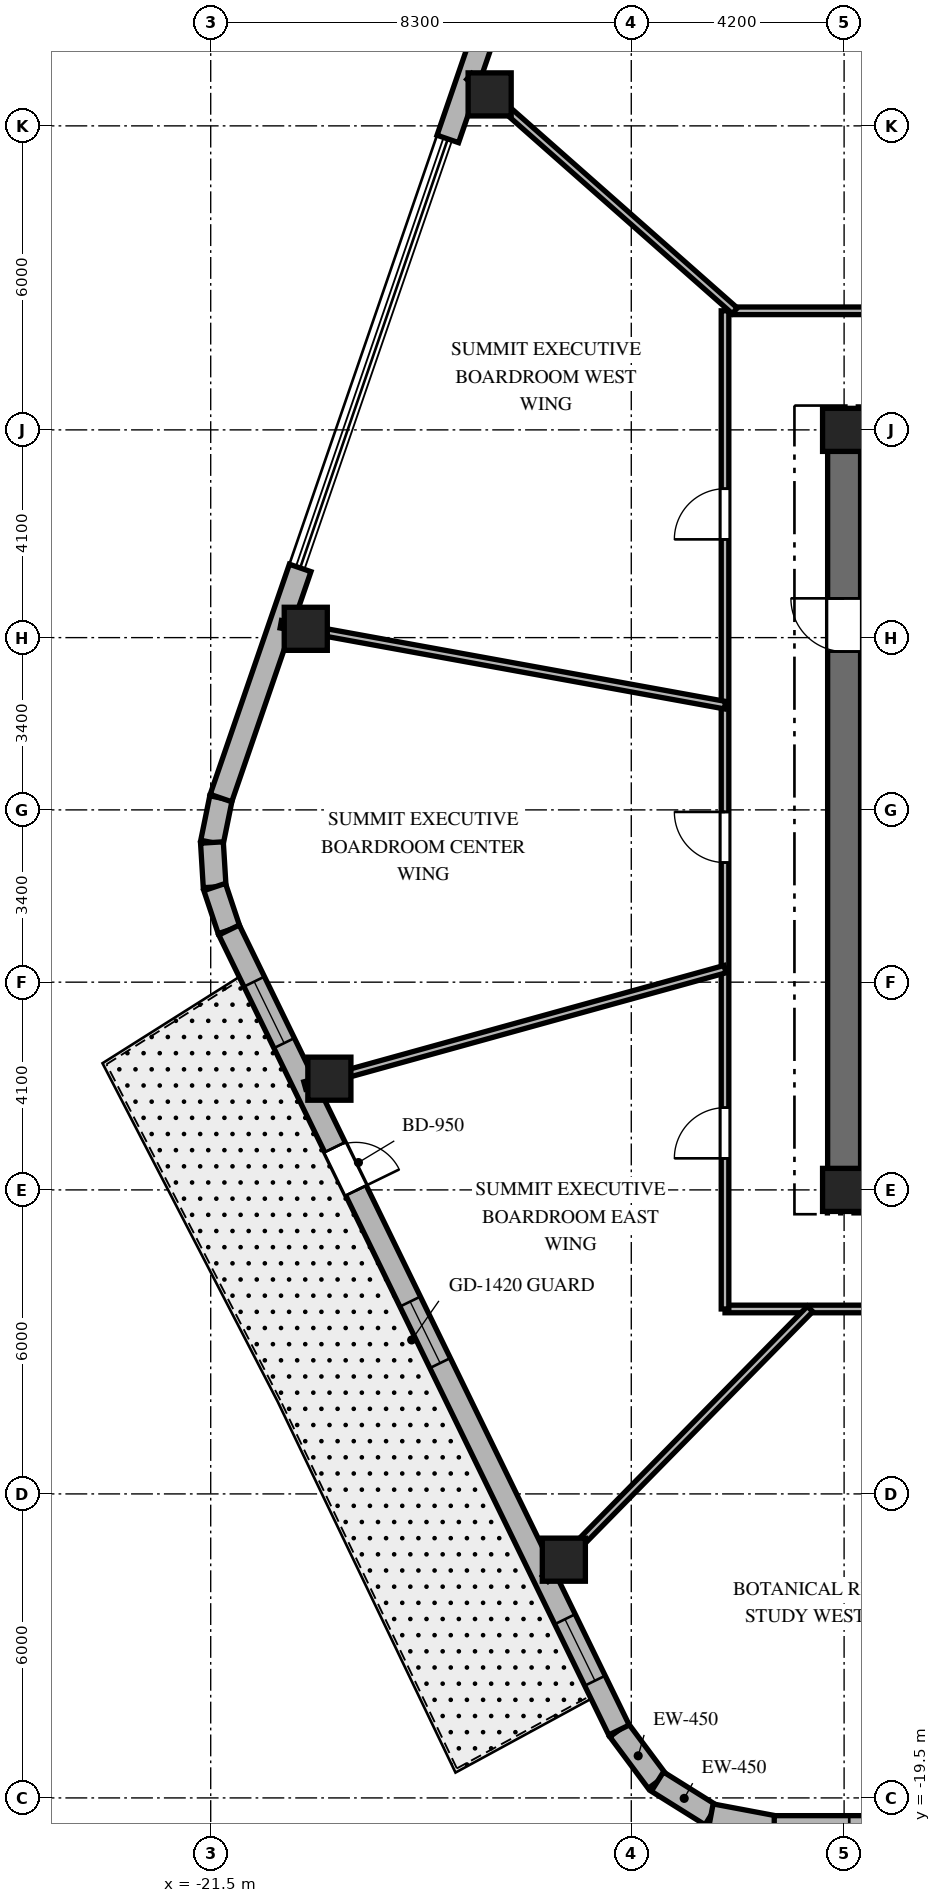
"""IFC4 building model, lengths in metres.
Left out: names, types, materials, properties, quantities, classifications, styles, units other than length and angle.
Written with IfcOpenShell. Run it as: python <this file> out.ifc"""

import sys

from ifc_helpers import new_model, si_unit, direction, frame, frame_2d, origin, origin_2d, place, context, subcontext, project, spatial, rectangle, extrude, element, fill, save


model = new_model("IFC4")
c1 = context("Model", 3, precision=1e-05, world=origin(), true_north=direction((0.0, 1.0)))
c2 = subcontext(c1, "Body", "Model", "MODEL_VIEW")
j1 = project(units=[si_unit("LENGTHUNIT", "METRE"), si_unit("PLANEANGLEUNIT", "RADIAN")], contexts=[c1])
p1 = place(None, origin())
s1 = spatial("IfcSite", under=j1, at=p1, CompositionType="ELEMENT")
p2 = place(p1, origin())
s2 = spatial("IfcBuilding", under=s1, at=p2, CompositionType="ELEMENT")
p3 = place(p2, frame((0.0, 0.0, 293.1)))
s3 = spatial("IfcBuildingStorey", under=s2, at=p3, CompositionType="ELEMENT", Elevation=293.1)
p4 = place(p3, frame((-9.325, -7.5, 0.0), z_axis=(0.0, 0.0, 1.0), x_axis=(1.0, 0.0, 0.0)))
e1 = element("IfcWall", 1, at=p4, inside=s3, PredefinedType="SHEAR", context=c2, shape_type="SweptSolid", body=[
    extrude(rectangle(XDim=18.65, YDim=0.65, at=frame_2d((9.325, 0.0))), origin(), (0.0, 0.0, 1.0), 4.5),
])
p5 = place(p4, frame((9.375, 0.0, 0.0)))
e2 = element("IfcOpeningElement", 2, at=p5, cuts=e1, PredefinedType="OPENING", context=c2, shape_type="SweptSolid", body=[
    extrude(rectangle(XDim=1.0, YDim=2.15, at=frame_2d((0.5, 1.075))), frame((0.0, 0.335, 0.0), z_axis=(0.0, -1.0, 0.0), x_axis=(1.0, 0.0, 0.0)), (0.0, 0.0, 1.0), 0.67),
])
p6 = place(p3, frame((-9.325, 7.5, 0.0), z_axis=(0.0, 0.0, 1.0), x_axis=(1.0, 0.0, 0.0)))
e3 = element("IfcWall", 3, at=p6, inside=s3, PredefinedType="SHEAR", context=c2, shape_type="SweptSolid", body=[
    extrude(rectangle(XDim=9.375, YDim=0.65, at=frame_2d((4.688, 0.0))), origin(), (0.0, 0.0, 1.0), 4.5),
])
p7 = place(p3, frame((-9.0, -7.175, 0.0), z_axis=(0.0, 0.0, 1.0), x_axis=(0.0, 1.0, 0.0)))
e4 = element("IfcWall", 4, at=p7, inside=s3, PredefinedType="SHEAR", context=c2, shape_type="SweptSolid", body=[
    extrude(rectangle(XDim=14.35, YDim=0.65, at=frame_2d((7.175, 0.0))), origin(), (0.0, 0.0, 1.0), 4.5),
])
p8 = place(p7, frame((10.3, 0.0, 0.0)))
e5 = element("IfcOpeningElement", 5, at=p8, cuts=e4, PredefinedType="OPENING", context=c2, shape_type="SweptSolid", body=[
    extrude(rectangle(XDim=1.05, YDim=2.15, at=frame_2d((0.525, 1.075))), frame((0.0, 0.335, 0.0), z_axis=(0.0, -1.0, 0.0), x_axis=(1.0, 0.0, 0.0)), (0.0, 0.0, 1.0), 0.67),
])
for number, where, z_axis, x_axis in (
    (6, (-9.0, -7.5, 0.0), (0.0, 0.0, 1.0), (1.0, 0.0, 0.0)),
    (7, (-9.0, 7.5, 0.0), (0.0, 0.0, 1.0), (1.0, 0.0, 0.0)),
    (8, (-15.995, 14.121, 0.0), (0.0, 0.0, 1.0), (1.0, 0.0, 0.0)),
    (9, (-19.624, 3.574, 0.0), (0.0, 0.0, 1.0), (1.0, 0.0, 0.0)),
    (10, (-19.158, -5.305, 0.0), (0.0, 0.0, 1.0), (1.0, 0.0, 0.0)),
    (11, (-14.531, -14.798, 0.0), (0.0, 0.0, 1.0), (1.0, 0.0, 0.0)),
):
    element("IfcColumn", number, at=place(p3, frame(where, z_axis=z_axis, x_axis=x_axis)), inside=s3, PredefinedType="COLUMN", context=c2, shape_type="SweptSolid", body=[
        extrude(rectangle(XDim=0.85, YDim=0.85, at=origin_2d()), origin(), (0.0, 0.0, 1.0), 4.5),
    ])
p9 = place(p3, frame((-13.443, -18.16, 0.0), z_axis=(0.0, 0.0, 1.0), x_axis=(0.597042425808, -0.802209661987, 0.0)))
e12 = element("IfcWall", 12, at=p9, inside=s3, PredefinedType="SOLIDWALL", context=c2, shape_type="SweptSolid", body=[
    extrude(rectangle(XDim=1.27, YDim=0.45, at=frame_2d((0.635, 0.0))), origin(), (0.0, 0.0, 1.0), 4.18),
])
p10 = place(p3, frame((-12.685, -19.178, 0.0), z_axis=(0.0, 0.0, 1.0), x_axis=(0.848031272749, -0.529946186362, 0.0)))
e13 = element("IfcWall", 13, at=p10, inside=s3, PredefinedType="SOLIDWALL", context=c2, shape_type="SweptSolid", body=[
    extrude(rectangle(XDim=1.248, YDim=0.45, at=frame_2d((0.624, 0.0))), origin(), (0.0, 0.0, 1.0), 4.18),
])
p11 = place(p3, frame((-11.626, -19.84, 0.0), z_axis=(0.0, 0.0, 1.0), x_axis=(0.982701956681, -0.185194126083, 0.0)))
e14 = element("IfcWall", 14, at=p11, inside=s3, PredefinedType="SOLIDWALL", context=c2, shape_type="SweptSolid", body=[
    extrude(rectangle(XDim=1.27, YDim=0.45, at=frame_2d((0.635, 0.0))), origin(), (0.0, 0.0, 1.0), 4.18),
])
p12 = place(p3, frame((-21.298, 0.233, 0.0), z_axis=(0.0, 0.0, 1.0), x_axis=(-0.199158176661, -0.979967356941, 0.0)))
e15 = element("IfcWall", 15, at=p12, inside=s3, PredefinedType="SOLIDWALL", context=c2, shape_type="SweptSolid", body=[
    extrude(rectangle(XDim=0.895, YDim=0.45, at=frame_2d((0.447, 0.0))), origin(), (0.0, 0.0, 1.0), 4.18),
])
p13 = place(p3, frame((-21.476, -0.644, 0.0), z_axis=(0.0, 0.0, 1.0), x_axis=(0.061031097918, -0.998135865044, 0.0)))
e16 = element("IfcWall", 16, at=p13, inside=s3, PredefinedType="SOLIDWALL", context=c2, shape_type="SweptSolid", body=[
    extrude(rectangle(XDim=0.88, YDim=0.45, at=frame_2d((0.44, 0.0))), origin(), (0.0, 0.0, 1.0), 4.18),
])
p14 = place(p3, frame((-21.422, -1.522, 0.0), z_axis=(0.0, 0.0, 1.0), x_axis=(0.316964162323, -0.94843751497, 0.0)))
e17 = element("IfcWall", 17, at=p14, inside=s3, PredefinedType="SOLIDWALL", context=c2, shape_type="SweptSolid", body=[
    extrude(rectangle(XDim=0.895, YDim=0.45, at=frame_2d((0.448, 0.0))), origin(), (0.0, 0.0, 1.0), 4.18),
])
p15 = place(p3, frame((-10.379, -20.075, 0.0), z_axis=(0.0, 0.0, 1.0), x_axis=(1.0, 0.0, 0.0)))
e18 = element("IfcWall", 18, at=p15, inside=s3, PredefinedType="SOLIDWALL", context=c2, shape_type="SweptSolid", body=[
    extrude(rectangle(XDim=22.417, YDim=0.45, at=frame_2d((11.208, 0.0))), origin(), (0.0, 0.0, 1.0), 4.18),
])
p16 = place(p15, frame((1.48, 0.0, 0.8)))
e19 = element("IfcOpeningElement", 19, at=p16, cuts=e18, PredefinedType="OPENING", context=c2, shape_type="SweptSolid", body=[
    extrude(rectangle(XDim=1.35, YDim=1.75, at=frame_2d((0.675, 0.875))), frame((0.0, 0.235, 0.0), z_axis=(0.0, -1.0, 0.0), x_axis=(1.0, 0.0, 0.0)), (0.0, 0.0, 1.0), 0.47),
])
p17 = place(p15, frame((10.534, 0.0, 0.8)))
e20 = element("IfcOpeningElement", 20, at=p17, cuts=e18, PredefinedType="OPENING", context=c2, shape_type="SweptSolid", body=[
    extrude(rectangle(XDim=1.35, YDim=1.75, at=frame_2d((0.675, 0.875))), frame((0.0, 0.235, 0.0), z_axis=(0.0, -1.0, 0.0), x_axis=(1.0, 0.0, 0.0)), (0.0, 0.0, 1.0), 0.47),
])
p18 = place(p15, frame((19.587, 0.0, 0.8)))
e21 = element("IfcOpeningElement", 21, at=p18, cuts=e18, PredefinedType="OPENING", context=c2, shape_type="SweptSolid", body=[
    extrude(rectangle(XDim=1.35, YDim=1.75, at=frame_2d((0.675, 0.875))), frame((0.0, 0.235, 0.0), z_axis=(0.0, -1.0, 0.0), x_axis=(1.0, 0.0, 0.0)), (0.0, 0.0, 1.0), 0.47),
])
p19 = place(p3, frame((-15.26, 17.776, 0.0), z_axis=(0.0, 0.0, 1.0), x_axis=(-0.325408461582, -0.945573547182, 0.0)))
e22 = element("IfcWall", 22, at=p19, inside=s3, PredefinedType="SOLIDWALL", context=c2, shape_type="SweptSolid", body=[
    extrude(rectangle(XDim=4.795, YDim=0.45, at=frame_2d((2.397, 0.0))), origin(), (0.0, 0.0, 1.0), 4.18),
])
p20 = place(p3, frame((-19.734, 4.775, 0.0), z_axis=(0.0, 0.0, 1.0), x_axis=(-0.325437701015, -0.945563484256, 0.0)))
e23 = element("IfcWall", 23, at=p20, inside=s3, PredefinedType="SOLIDWALL", context=c2, shape_type="SweptSolid", body=[
    extrude(rectangle(XDim=4.803, YDim=0.45, at=frame_2d((2.402, 0.0))), origin(), (0.0, 0.0, 1.0), 4.18),
])
p21 = place(p3, frame((-21.138, -2.371, 0.0), z_axis=(0.0, 0.0, 1.0), x_axis=(0.438128124058, -0.89891253574, 0.0)))
e24 = element("IfcWall", 24, at=p21, inside=s3, PredefinedType="SOLIDWALL", context=c2, shape_type="SweptSolid", body=[
    extrude(rectangle(XDim=17.565, YDim=0.45, at=frame_2d((8.782, 0.0))), origin(), (0.0, 0.0, 1.0), 4.18),
])
p22 = place(p21, frame((4.769, 0.0, 0.0)))
e25 = element("IfcOpeningElement", 25, at=p22, cuts=e24, PredefinedType="OPENING", context=c2, shape_type="SweptSolid", body=[
    extrude(rectangle(XDim=0.95, YDim=2.15, at=frame_2d((0.475, 1.075))), frame((0.0, 0.235, 0.0), z_axis=(0.0, -1.0, 0.0), x_axis=(1.0, 0.0, 0.0)), (0.0, 0.0, 1.0), 0.47),
])
p23 = place(p21, frame((1.133, 0.0, 0.8)))
e26 = element("IfcOpeningElement", 26, at=p23, cuts=e24, PredefinedType="OPENING", context=c2, shape_type="SweptSolid", body=[
    extrude(rectangle(XDim=1.35, YDim=1.75, at=frame_2d((0.675, 0.875))), frame((0.0, 0.235, 0.0), z_axis=(0.0, -1.0, 0.0), x_axis=(1.0, 0.0, 0.0)), (0.0, 0.0, 1.0), 0.47),
])
p24 = place(p21, frame((8.158, 0.0, 0.8)))
e27 = element("IfcOpeningElement", 27, at=p24, cuts=e24, PredefinedType="OPENING", context=c2, shape_type="SweptSolid", body=[
    extrude(rectangle(XDim=1.35, YDim=1.75, at=frame_2d((0.675, 0.875))), frame((0.0, 0.235, 0.0), z_axis=(0.0, -1.0, 0.0), x_axis=(1.0, 0.0, 0.0)), (0.0, 0.0, 1.0), 0.47),
])
p25 = place(p21, frame((15.132, 0.0, 0.8)))
e28 = element("IfcOpeningElement", 28, at=p25, cuts=e24, PredefinedType="OPENING", context=c2, shape_type="SweptSolid", body=[
    extrude(rectangle(XDim=1.35, YDim=1.75, at=frame_2d((0.675, 0.875))), frame((0.0, 0.235, 0.0), z_axis=(0.0, -1.0, 0.0), x_axis=(1.0, 0.0, 0.0)), (0.0, 0.0, 1.0), 0.47),
])
p26 = place(p3, frame((-11.35, 9.85, 0.0), z_axis=(0.0, 0.0, 1.0), x_axis=(1.0, 0.0, 0.0)))
e29 = element("IfcWall", 29, at=p26, inside=s3, PredefinedType="PARTITIONING", context=c2, shape_type="SweptSolid", body=[
    extrude(rectangle(XDim=22.7, YDim=0.15, at=frame_2d((11.35, 0.0))), origin(), (0.0, 0.0, 1.0), 3.67),
])
p27 = place(p26, frame((18.896, 0.0, 0.0)))
e30 = element("IfcOpeningElement", 30, at=p27, cuts=e29, PredefinedType="OPENING", context=c2, shape_type="SweptSolid", body=[
    extrude(rectangle(XDim=1.0, YDim=2.03, at=frame_2d((0.5, 1.015))), frame((0.0, 0.085, 0.0), z_axis=(0.0, -1.0, 0.0), x_axis=(1.0, 0.0, 0.0)), (0.0, 0.0, 1.0), 0.17),
])
p28 = place(p3, frame((11.35, -9.85, 0.0), z_axis=(0.0, 0.0, 1.0), x_axis=(-1.0, 0.0, 0.0)))
e31 = element("IfcWall", 31, at=p28, inside=s3, PredefinedType="PARTITIONING", context=c2, shape_type="SweptSolid", body=[
    extrude(rectangle(XDim=22.7, YDim=0.15, at=frame_2d((11.35, 0.0))), origin(), (0.0, 0.0, 1.0), 3.67),
])
p29 = place(p28, frame((17.22, 0.0, 0.0)))
e32 = element("IfcOpeningElement", 32, at=p29, cuts=e31, PredefinedType="OPENING", context=c2, shape_type="SweptSolid", body=[
    extrude(rectangle(XDim=1.0, YDim=2.03, at=frame_2d((0.5, 1.015))), frame((0.0, 0.085, 0.0), z_axis=(0.0, -1.0, 0.0), x_axis=(1.0, 0.0, 0.0)), (0.0, 0.0, 1.0), 0.17),
])
p30 = place(p28, frame((10.429, 0.0, 0.0)))
e33 = element("IfcOpeningElement", 33, at=p30, cuts=e31, PredefinedType="OPENING", context=c2, shape_type="SweptSolid", body=[
    extrude(rectangle(XDim=1.0, YDim=2.03, at=frame_2d((0.5, 1.015))), frame((0.0, 0.085, 0.0), z_axis=(0.0, -1.0, 0.0), x_axis=(1.0, 0.0, 0.0)), (0.0, 0.0, 1.0), 0.17),
])
p31 = place(p28, frame((3.391, 0.0, 0.0)))
e34 = element("IfcOpeningElement", 34, at=p31, cuts=e31, PredefinedType="OPENING", context=c2, shape_type="SweptSolid", body=[
    extrude(rectangle(XDim=1.0, YDim=2.03, at=frame_2d((0.5, 1.015))), frame((0.0, 0.085, 0.0), z_axis=(0.0, -1.0, 0.0), x_axis=(1.0, 0.0, 0.0)), (0.0, 0.0, 1.0), 0.17),
])
p32 = place(p3, frame((-11.35, -9.85, 0.0), z_axis=(0.0, 0.0, 1.0), x_axis=(0.0, 1.0, 0.0)))
e35 = element("IfcWall", 35, at=p32, inside=s3, PredefinedType="PARTITIONING", context=c2, shape_type="SweptSolid", body=[
    extrude(rectangle(XDim=19.7, YDim=0.15, at=frame_2d((9.85, 0.0))), origin(), (0.0, 0.0, 1.0), 3.67),
])
p33 = place(p32, frame((15.189, 0.0, 0.0)))
e36 = element("IfcOpeningElement", 36, at=p33, cuts=e35, PredefinedType="OPENING", context=c2, shape_type="SweptSolid", body=[
    extrude(rectangle(XDim=1.0, YDim=2.03, at=frame_2d((0.5, 1.015))), frame((0.0, 0.085, 0.0), z_axis=(0.0, -1.0, 0.0), x_axis=(1.0, 0.0, 0.0)), (0.0, 0.0, 1.0), 0.17),
])
p34 = place(p32, frame((8.81, 0.0, 0.0)))
e37 = element("IfcOpeningElement", 37, at=p34, cuts=e35, PredefinedType="OPENING", context=c2, shape_type="SweptSolid", body=[
    extrude(rectangle(XDim=1.0, YDim=2.03, at=frame_2d((0.5, 1.015))), frame((0.0, 0.085, 0.0), z_axis=(0.0, -1.0, 0.0), x_axis=(1.0, 0.0, 0.0)), (0.0, 0.0, 1.0), 0.17),
])
p35 = place(p32, frame((2.973, 0.0, 0.0)))
e38 = element("IfcOpeningElement", 38, at=p35, cuts=e35, PredefinedType="OPENING", context=c2, shape_type="SweptSolid", body=[
    extrude(rectangle(XDim=1.0, YDim=2.03, at=frame_2d((0.5, 1.015))), frame((0.0, 0.085, 0.0), z_axis=(0.0, -1.0, 0.0), x_axis=(1.0, 0.0, 0.0)), (0.0, 0.0, 1.0), 0.17),
])
p36 = place(p3, frame((-11.157, 9.85, 0.0), z_axis=(0.0, 0.0, 1.0), x_axis=(-0.74966962095, 0.661812253909, 0.0)))
e39 = element("IfcWall", 39, at=p36, inside=s3, PredefinedType="PARTITIONING", context=c2, shape_type="SweptSolid", body=[
    extrude(rectangle(XDim=6.989, YDim=0.15, at=frame_2d((3.494, 0.0))), origin(), (0.0, 0.0, 1.0), 3.52),
])
p37 = place(p3, frame((-11.35, 2.067, 0.0), z_axis=(0.0, 0.0, 1.0), x_axis=(-0.983816386236, 0.179179569634, 0.0)))
e40 = element("IfcWall", 40, at=p37, inside=s3, PredefinedType="PARTITIONING", context=c2, shape_type="SweptSolid", body=[
    extrude(rectangle(XDim=8.911, YDim=0.15, at=frame_2d((4.456, 0.0))), origin(), (0.0, 0.0, 1.0), 3.52),
])
p38 = place(p3, frame((-11.35, -3.143, 0.0), z_axis=(0.0, 0.0, 1.0), x_axis=(-0.963731818141, -0.266872596386, 0.0)))
e41 = element("IfcWall", 41, at=p38, inside=s3, PredefinedType="PARTITIONING", context=c2, shape_type="SweptSolid", body=[
    extrude(rectangle(XDim=8.605, YDim=0.15, at=frame_2d((4.302, 0.0))), origin(), (0.0, 0.0, 1.0), 3.52),
])
p39 = place(p3, frame((-9.672, -9.85, 0.0), z_axis=(0.0, 0.0, 1.0), x_axis=(-0.700629771301, -0.713524998558, 0.0)))
e42 = element("IfcWall", 42, at=p39, inside=s3, PredefinedType="PARTITIONING", context=c2, shape_type="SweptSolid", body=[
    extrude(rectangle(XDim=7.459, YDim=0.15, at=frame_2d((3.73, 0.0))), origin(), (0.0, 0.0, 1.0), 3.52),
])
p40 = place(p22, origin())
e43 = element("IfcDoor", 43, at=p40, inside=s3, OperationType="SINGLE_SWING_RIGHT", PredefinedType="DOOR", context=c2, shape_type="SweptSolid", body=[
    extrude(rectangle(XDim=0.95, YDim=2.15, at=frame_2d((0.475, 1.075))), frame((0.0, 0.025, 0.0), z_axis=(0.0, -1.0, 0.0), x_axis=(1.0, 0.0, 0.0)), (0.0, 0.0, 1.0), 0.05),
])
fill(e25, e43)
p41 = place(p23, origin())
e44 = element("IfcWindow", 44, at=p41, inside=s3, PartitioningType="SINGLE_PANEL", PredefinedType="WINDOW", context=c2, shape_type="SweptSolid", body=[
    extrude(rectangle(XDim=1.35, YDim=1.75, at=frame_2d((0.675, 0.875))), frame((0.0, 0.03, 0.0), z_axis=(0.0, -1.0, 0.0), x_axis=(1.0, 0.0, 0.0)), (0.0, 0.0, 1.0), 0.06),
])
fill(e26, e44)
p42 = place(p24, origin())
e45 = element("IfcWindow", 45, at=p42, inside=s3, PartitioningType="SINGLE_PANEL", PredefinedType="WINDOW", context=c2, shape_type="SweptSolid", body=[
    extrude(rectangle(XDim=1.35, YDim=1.75, at=frame_2d((0.675, 0.875))), frame((0.0, 0.03, 0.0), z_axis=(0.0, -1.0, 0.0), x_axis=(1.0, 0.0, 0.0)), (0.0, 0.0, 1.0), 0.06),
])
fill(e27, e45)
p43 = place(p25, origin())
e46 = element("IfcWindow", 46, at=p43, inside=s3, PartitioningType="SINGLE_PANEL", PredefinedType="WINDOW", context=c2, shape_type="SweptSolid", body=[
    extrude(rectangle(XDim=1.35, YDim=1.75, at=frame_2d((0.675, 0.875))), frame((0.0, 0.03, 0.0), z_axis=(0.0, -1.0, 0.0), x_axis=(1.0, 0.0, 0.0)), (0.0, 0.0, 1.0), 0.06),
])
fill(e28, e46)
p44 = place(p8, origin())
e47 = element("IfcDoor", 47, at=p44, inside=s3, OperationType="SINGLE_SWING_RIGHT", PredefinedType="DOOR", context=c2, shape_type="SweptSolid", body=[
    extrude(rectangle(XDim=1.05, YDim=2.15, at=frame_2d((0.525, 1.075))), frame((0.0, 0.025, 0.0), z_axis=(0.0, -1.0, 0.0), x_axis=(1.0, 0.0, 0.0)), (0.0, 0.0, 1.0), 0.05),
])
fill(e5, e47)
p45 = place(p33, origin())
e48 = element("IfcDoor", 48, at=p45, inside=s3, OperationType="SINGLE_SWING_LEFT", PredefinedType="DOOR", context=c2, shape_type="SweptSolid", body=[
    extrude(rectangle(XDim=1.0, YDim=2.03, at=frame_2d((0.5, 1.015))), frame((0.0, 0.025, 0.0), z_axis=(0.0, -1.0, 0.0), x_axis=(1.0, 0.0, 0.0)), (0.0, 0.0, 1.0), 0.05),
])
fill(e36, e48)
p46 = place(p34, origin())
e49 = element("IfcDoor", 49, at=p46, inside=s3, OperationType="SINGLE_SWING_RIGHT", PredefinedType="DOOR", context=c2, shape_type="SweptSolid", body=[
    extrude(rectangle(XDim=1.0, YDim=2.03, at=frame_2d((0.5, 1.015))), frame((0.0, 0.025, 0.0), z_axis=(0.0, -1.0, 0.0), x_axis=(1.0, 0.0, 0.0)), (0.0, 0.0, 1.0), 0.05),
])
fill(e37, e49)
p47 = place(p35, origin())
e50 = element("IfcDoor", 50, at=p47, inside=s3, OperationType="SINGLE_SWING_LEFT", PredefinedType="DOOR", context=c2, shape_type="SweptSolid", body=[
    extrude(rectangle(XDim=1.0, YDim=2.03, at=frame_2d((0.5, 1.015))), frame((0.0, 0.025, 0.0), z_axis=(0.0, -1.0, 0.0), x_axis=(1.0, 0.0, 0.0)), (0.0, 0.0, 1.0), 0.05),
])
fill(e38, e50)
save(model, sys.argv[1])
